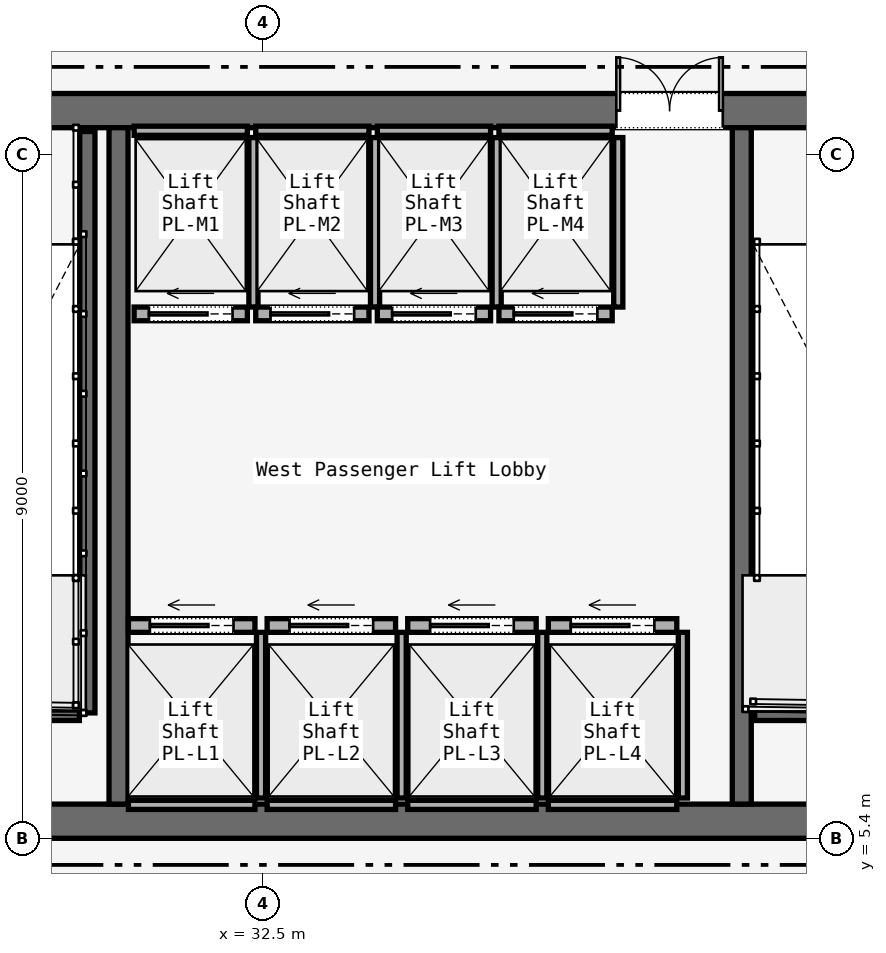
"""IFC4 building model, lengths in metres.
Left out: names, types, materials, properties, quantities, classifications, styles, units other than length and angle.
Written with IfcOpenShell. Run it as: python <this file> out.ifc"""

import sys

from ifc_helpers import new_model, si_unit, direction, frame, frame_2d, origin, place, context, subcontext, project, spatial, rectangle, extrude, element, fill, save


model = new_model("IFC4")
c1 = context("Model", 3, precision=1e-05, world=origin(), true_north=direction((0.0, 1.0)))
c2 = subcontext(c1, "Body", "Model", "MODEL_VIEW")
j1 = project(units=[si_unit("LENGTHUNIT", "METRE"), si_unit("PLANEANGLEUNIT", "RADIAN")], contexts=[c1])
p1 = place(None, origin())
s1 = spatial("IfcSite", under=j1, at=p1, CompositionType="ELEMENT")
p2 = place(p1, origin())
s2 = spatial("IfcBuilding", under=s1, at=p2, CompositionType="ELEMENT")
p3 = place(p2, origin())
s3 = spatial("IfcBuildingStorey", under=s2, at=p3, CompositionType="ELEMENT", Elevation=0.0)
p4 = place(p3, frame((26.45, 14.975, 0.0), z_axis=(0.0, 0.0, 1.0), x_axis=(1.0, 0.0, 0.0)))
e1 = element("IfcWall", 1, at=p4, inside=s3, PredefinedType="SOLIDWALL", context=c2, shape_type="SweptSolid", body=[
    extrude(rectangle(XDim=31.1, YDim=0.45, at=frame_2d((15.55, 0.0))), origin(), (0.0, 0.0, 1.0), 5.7),
])
p5 = place(p4, frame((1.65, 0.0, 0.0)))
e2 = element("IfcOpeningElement", 2, at=p5, cuts=e1, PredefinedType="OPENING", context=c2, shape_type="SweptSolid", body=[
    extrude(rectangle(XDim=1.1, YDim=2.2, at=frame_2d((0.55, 1.1))), frame((0.0, 0.225, 0.0), z_axis=(0.0, -1.0, 0.0), x_axis=(1.0, 0.0, 0.0)), (0.0, 0.0, 1.0), 0.45),
])
p6 = place(p4, frame((13.65, 0.0, 0.0)))
e3 = element("IfcOpeningElement", 3, at=p6, cuts=e1, PredefinedType="OPENING", context=c2, shape_type="SweptSolid", body=[
    extrude(rectangle(XDim=1.1, YDim=2.2, at=frame_2d((0.55, 1.1))), frame((0.0, 0.225, 0.0), z_axis=(0.0, -1.0, 0.0), x_axis=(1.0, 0.0, 0.0)), (0.0, 0.0, 1.0), 0.45),
])
p7 = place(p4, frame((25.55, 0.0, 0.0)))
e4 = element("IfcOpeningElement", 4, at=p7, cuts=e1, PredefinedType="OPENING", context=c2, shape_type="SweptSolid", body=[
    extrude(rectangle(XDim=1.1, YDim=2.2, at=frame_2d((0.55, 1.1))), frame((0.0, 0.225, 0.0), z_axis=(0.0, -1.0, 0.0), x_axis=(1.0, 0.0, 0.0)), (0.0, 0.0, 1.0), 0.45),
])
p8 = place(p4, frame((10.7, 0.0, 0.0)))
e5 = element("IfcOpeningElement", 5, at=p8, cuts=e1, PredefinedType="OPENING", context=c2, shape_type="SweptSolid", body=[
    extrude(rectangle(XDim=1.4, YDim=2.2, at=frame_2d((0.7, 1.1))), frame((0.0, 0.225, 0.0), z_axis=(0.0, -1.0, 0.0), x_axis=(1.0, 0.0, 0.0)), (0.0, 0.0, 1.0), 0.45),
])
p9 = place(p4, frame((19.35, 0.0, 0.0)))
e6 = element("IfcOpeningElement", 6, at=p9, cuts=e1, PredefinedType="OPENING", context=c2, shape_type="SweptSolid", body=[
    extrude(rectangle(XDim=1.1, YDim=2.2, at=frame_2d((0.55, 1.1))), frame((0.0, 0.225, 0.0), z_axis=(0.0, -1.0, 0.0), x_axis=(1.0, 0.0, 0.0)), (0.0, 0.0, 1.0), 0.45),
])
p10 = place(p4, frame((21.4, 0.0, 0.0)))
e7 = element("IfcOpeningElement", 7, at=p10, cuts=e1, PredefinedType="OPENING", context=c2, shape_type="SweptSolid", body=[
    extrude(rectangle(XDim=0.9, YDim=2.1, at=frame_2d((0.45, 1.05))), frame((0.0, 0.225, 0.0), z_axis=(0.0, -1.0, 0.0), x_axis=(1.0, 0.0, 0.0)), (0.0, 0.0, 1.0), 0.45),
])
p11 = place(p4, frame((23.35, 0.0, 0.0)))
e8 = element("IfcOpeningElement", 8, at=p11, cuts=e1, PredefinedType="OPENING", context=c2, shape_type="SweptSolid", body=[
    extrude(rectangle(XDim=1.3, YDim=2.3, at=frame_2d((0.65, 1.15))), frame((0.0, 0.225, 0.0), z_axis=(0.0, -1.0, 0.0), x_axis=(1.0, 0.0, 0.0)), (0.0, 0.0, 1.0), 0.45),
])
p12 = place(p3, frame((26.45, 5.625, 0.0), z_axis=(0.0, 0.0, 1.0), x_axis=(1.0, 0.0, 0.0)))
e9 = element("IfcWall", 9, at=p12, inside=s3, PredefinedType="SOLIDWALL", context=c2, shape_type="SweptSolid", body=[
    extrude(rectangle(XDim=31.1, YDim=0.45, at=frame_2d((15.55, 0.0))), origin(), (0.0, 0.0, 1.0), 5.7),
])
for number, where, z_axis, x_axis in (
    (10, (30.6, 5.85, 0.0), (0.0, 0.0, 1.0), (0.0, 1.0, 0.0)),
    (11, (38.8, 5.85, 0.0), (0.0, 0.0, 1.0), (0.0, 1.0, 0.0)),
):
    element("IfcWall", number, at=place(p3, frame(where, z_axis=z_axis, x_axis=x_axis)), inside=s3, PredefinedType="SOLIDWALL", context=c2, shape_type="SweptSolid", body=[
        extrude(rectangle(XDim=8.9, YDim=0.25, at=frame_2d((4.45, 0.0))), origin(), (0.0, 0.0, 1.0), 5.7),
    ])
p13 = place(p3, frame((30.19, 14.7, 0.0), z_axis=(0.0, 0.0, 1.0), x_axis=(0.0, -1.0, 0.0)))
e12 = element("IfcWall", 12, at=p13, inside=s3, PredefinedType="SOLIDWALL", context=c2, shape_type="SweptSolid", body=[
    extrude(rectangle(XDim=7.65, YDim=0.2, at=frame_2d((3.825, 0.0))), origin(), (0.0, 0.0, 1.0), 6.0),
])
for number, where, z_axis, x_axis in (
    (13, (26.97, 7.05, 0.0), (0.0, 0.0, 1.0), (1.0, 0.0, 0.0)),
    (14, (38.97, 7.05, 0.0), (0.0, 0.0, 1.0), (1.0, 0.0, 0.0)),
):
    element("IfcWall", number, at=place(p3, frame(where, z_axis=z_axis, x_axis=x_axis)), inside=s3, PredefinedType="SOLIDWALL", context=c2, shape_type="SweptSolid", body=[
        extrude(rectangle(XDim=3.115, YDim=0.2, at=frame_2d((1.558, 0.0))), origin(), (0.0, 0.0, 1.0), 6.0),
    ])
p14 = place(p3, frame((30.73, 8.2, 0.0), z_axis=(0.0, 0.0, 1.0), x_axis=(1.0, 0.0, 0.0)))
e15 = element("IfcWall", 15, at=p14, inside=s3, PredefinedType="SOLIDWALL", context=c2, shape_type="SweptSolid", body=[
    extrude(rectangle(XDim=1.665, YDim=0.18, at=frame_2d((0.833, 0.0))), origin(), (0.0, 0.0, 1.0), 3.6),
])
p15 = place(p14, frame((0.282, 0.0, 0.0)))
e16 = element("IfcOpeningElement", 16, at=p15, cuts=e15, PredefinedType="OPENING", context=c2, shape_type="SweptSolid", body=[
    extrude(rectangle(XDim=1.1, YDim=2.2, at=frame_2d((0.55, 1.1))), frame((0.0, 0.09, 0.0), z_axis=(0.0, -1.0, 0.0), x_axis=(1.0, 0.0, 0.0)), (0.0, 0.0, 1.0), 0.18),
])
p16 = place(p3, frame((30.73, 5.84, 0.0), z_axis=(0.0, 0.0, 1.0), x_axis=(1.0, 0.0, 0.0)))
e17 = element("IfcWall", 17, at=p16, inside=s3, PredefinedType="SOLIDWALL", context=c2, shape_type="SweptSolid", body=[
    extrude(rectangle(XDim=1.665, YDim=0.12, at=frame_2d((0.833, 0.0))), origin(), (0.0, 0.0, 1.0), 3.6),
])
p17 = place(p3, frame((32.475, 5.93, 0.0), z_axis=(0.0, 0.0, 1.0), x_axis=(0.0, 1.0, 0.0)))
e18 = element("IfcWall", 18, at=p17, inside=s3, PredefinedType="SOLIDWALL", context=c2, shape_type="SweptSolid", body=[
    extrude(rectangle(XDim=2.18, YDim=0.12, at=frame_2d((1.09, 0.0))), origin(), (0.0, 0.0, 1.0), 3.6),
])
p18 = place(p3, frame((32.555, 8.2, 0.0), z_axis=(0.0, 0.0, 1.0), x_axis=(1.0, 0.0, 0.0)))
e19 = element("IfcWall", 19, at=p18, inside=s3, PredefinedType="SOLIDWALL", context=c2, shape_type="SweptSolid", body=[
    extrude(rectangle(XDim=1.69, YDim=0.18, at=frame_2d((0.845, 0.0))), origin(), (0.0, 0.0, 1.0), 3.6),
])
p19 = place(p18, frame((0.295, 0.0, 0.0)))
e20 = element("IfcOpeningElement", 20, at=p19, cuts=e19, PredefinedType="OPENING", context=c2, shape_type="SweptSolid", body=[
    extrude(rectangle(XDim=1.1, YDim=2.2, at=frame_2d((0.55, 1.1))), frame((0.0, 0.09, 0.0), z_axis=(0.0, -1.0, 0.0), x_axis=(1.0, 0.0, 0.0)), (0.0, 0.0, 1.0), 0.18),
])
p20 = place(p3, frame((32.555, 5.84, 0.0), z_axis=(0.0, 0.0, 1.0), x_axis=(1.0, 0.0, 0.0)))
e21 = element("IfcWall", 21, at=p20, inside=s3, PredefinedType="SOLIDWALL", context=c2, shape_type="SweptSolid", body=[
    extrude(rectangle(XDim=1.69, YDim=0.12, at=frame_2d((0.845, 0.0))), origin(), (0.0, 0.0, 1.0), 3.6),
])
p21 = place(p3, frame((34.325, 5.93, 0.0), z_axis=(0.0, 0.0, 1.0), x_axis=(0.0, 1.0, 0.0)))
e22 = element("IfcWall", 22, at=p21, inside=s3, PredefinedType="SOLIDWALL", context=c2, shape_type="SweptSolid", body=[
    extrude(rectangle(XDim=2.18, YDim=0.12, at=frame_2d((1.09, 0.0))), origin(), (0.0, 0.0, 1.0), 3.6),
])
p22 = place(p3, frame((34.405, 8.2, 0.0), z_axis=(0.0, 0.0, 1.0), x_axis=(1.0, 0.0, 0.0)))
e23 = element("IfcWall", 23, at=p22, inside=s3, PredefinedType="SOLIDWALL", context=c2, shape_type="SweptSolid", body=[
    extrude(rectangle(XDim=1.69, YDim=0.18, at=frame_2d((0.845, 0.0))), origin(), (0.0, 0.0, 1.0), 3.6),
])
p23 = place(p22, frame((0.295, 0.0, 0.0)))
e24 = element("IfcOpeningElement", 24, at=p23, cuts=e23, PredefinedType="OPENING", context=c2, shape_type="SweptSolid", body=[
    extrude(rectangle(XDim=1.1, YDim=2.2, at=frame_2d((0.55, 1.1))), frame((0.0, 0.09, 0.0), z_axis=(0.0, -1.0, 0.0), x_axis=(1.0, 0.0, 0.0)), (0.0, 0.0, 1.0), 0.18),
])
p24 = place(p3, frame((34.405, 5.84, 0.0), z_axis=(0.0, 0.0, 1.0), x_axis=(1.0, 0.0, 0.0)))
e25 = element("IfcWall", 25, at=p24, inside=s3, PredefinedType="SOLIDWALL", context=c2, shape_type="SweptSolid", body=[
    extrude(rectangle(XDim=1.69, YDim=0.12, at=frame_2d((0.845, 0.0))), origin(), (0.0, 0.0, 1.0), 3.6),
])
p25 = place(p3, frame((36.175, 5.93, 0.0), z_axis=(0.0, 0.0, 1.0), x_axis=(0.0, 1.0, 0.0)))
e26 = element("IfcWall", 26, at=p25, inside=s3, PredefinedType="SOLIDWALL", context=c2, shape_type="SweptSolid", body=[
    extrude(rectangle(XDim=2.18, YDim=0.12, at=frame_2d((1.09, 0.0))), origin(), (0.0, 0.0, 1.0), 3.6),
])
p26 = place(p3, frame((36.255, 8.2, 0.0), z_axis=(0.0, 0.0, 1.0), x_axis=(1.0, 0.0, 0.0)))
e27 = element("IfcWall", 27, at=p26, inside=s3, PredefinedType="SOLIDWALL", context=c2, shape_type="SweptSolid", body=[
    extrude(rectangle(XDim=1.69, YDim=0.18, at=frame_2d((0.845, 0.0))), origin(), (0.0, 0.0, 1.0), 3.6),
])
p27 = place(p26, frame((0.295, 0.0, 0.0)))
e28 = element("IfcOpeningElement", 28, at=p27, cuts=e27, PredefinedType="OPENING", context=c2, shape_type="SweptSolid", body=[
    extrude(rectangle(XDim=1.1, YDim=2.2, at=frame_2d((0.55, 1.1))), frame((0.0, 0.09, 0.0), z_axis=(0.0, -1.0, 0.0), x_axis=(1.0, 0.0, 0.0)), (0.0, 0.0, 1.0), 0.18),
])
p28 = place(p3, frame((36.255, 5.84, 0.0), z_axis=(0.0, 0.0, 1.0), x_axis=(1.0, 0.0, 0.0)))
e29 = element("IfcWall", 29, at=p28, inside=s3, PredefinedType="SOLIDWALL", context=c2, shape_type="SweptSolid", body=[
    extrude(rectangle(XDim=1.69, YDim=0.12, at=frame_2d((0.845, 0.0))), origin(), (0.0, 0.0, 1.0), 3.6),
])
p29 = place(p3, frame((38.025, 5.93, 0.0), z_axis=(0.0, 0.0, 1.0), x_axis=(0.0, 1.0, 0.0)))
e30 = element("IfcWall", 30, at=p29, inside=s3, PredefinedType="SOLIDWALL", context=c2, shape_type="SweptSolid", body=[
    extrude(rectangle(XDim=2.18, YDim=0.12, at=frame_2d((1.09, 0.0))), origin(), (0.0, 0.0, 1.0), 3.6),
])
p30 = place(p3, frame((30.805, 12.3, 0.0), z_axis=(0.0, 0.0, 1.0), x_axis=(1.0, 0.0, 0.0)))
e31 = element("IfcWall", 31, at=p30, inside=s3, PredefinedType="SOLIDWALL", context=c2, shape_type="SweptSolid", body=[
    extrude(rectangle(XDim=1.49, YDim=0.18, at=frame_2d((0.745, 0.0))), origin(), (0.0, 0.0, 1.0), 3.6),
])
p31 = place(p30, frame((0.195, 0.0, 0.0)))
e32 = element("IfcOpeningElement", 32, at=p31, cuts=e31, PredefinedType="OPENING", context=c2, shape_type="SweptSolid", body=[
    extrude(rectangle(XDim=1.1, YDim=2.2, at=frame_2d((0.55, 1.1))), frame((0.0, 0.09, 0.0), z_axis=(0.0, -1.0, 0.0), x_axis=(1.0, 0.0, 0.0)), (0.0, 0.0, 1.0), 0.18),
])
p32 = place(p3, frame((30.805, 14.71, 0.0), z_axis=(0.0, 0.0, 1.0), x_axis=(1.0, 0.0, 0.0)))
e33 = element("IfcWall", 33, at=p32, inside=s3, PredefinedType="SOLIDWALL", context=c2, shape_type="SweptSolid", body=[
    extrude(rectangle(XDim=1.49, YDim=0.12, at=frame_2d((0.745, 0.0))), origin(), (0.0, 0.0, 1.0), 3.6),
])
p33 = place(p3, frame((32.375, 12.39, 0.0), z_axis=(0.0, 0.0, 1.0), x_axis=(0.0, 1.0, 0.0)))
e34 = element("IfcWall", 34, at=p33, inside=s3, PredefinedType="SOLIDWALL", context=c2, shape_type="SweptSolid", body=[
    extrude(rectangle(XDim=2.23, YDim=0.12, at=frame_2d((1.115, 0.0))), origin(), (0.0, 0.0, 1.0), 3.6),
])
p34 = place(p3, frame((32.405, 12.3, 0.0), z_axis=(0.0, 0.0, 1.0), x_axis=(1.0, 0.0, 0.0)))
e35 = element("IfcWall", 35, at=p34, inside=s3, PredefinedType="SOLIDWALL", context=c2, shape_type="SweptSolid", body=[
    extrude(rectangle(XDim=1.49, YDim=0.18, at=frame_2d((0.745, 0.0))), origin(), (0.0, 0.0, 1.0), 3.6),
])
p35 = place(p34, frame((0.195, 0.0, 0.0)))
e36 = element("IfcOpeningElement", 36, at=p35, cuts=e35, PredefinedType="OPENING", context=c2, shape_type="SweptSolid", body=[
    extrude(rectangle(XDim=1.1, YDim=2.2, at=frame_2d((0.55, 1.1))), frame((0.0, 0.09, 0.0), z_axis=(0.0, -1.0, 0.0), x_axis=(1.0, 0.0, 0.0)), (0.0, 0.0, 1.0), 0.18),
])
p36 = place(p3, frame((32.405, 14.71, 0.0), z_axis=(0.0, 0.0, 1.0), x_axis=(1.0, 0.0, 0.0)))
e37 = element("IfcWall", 37, at=p36, inside=s3, PredefinedType="SOLIDWALL", context=c2, shape_type="SweptSolid", body=[
    extrude(rectangle(XDim=1.49, YDim=0.12, at=frame_2d((0.745, 0.0))), origin(), (0.0, 0.0, 1.0), 3.6),
])
p37 = place(p3, frame((33.975, 12.39, 0.0), z_axis=(0.0, 0.0, 1.0), x_axis=(0.0, 1.0, 0.0)))
e38 = element("IfcWall", 38, at=p37, inside=s3, PredefinedType="SOLIDWALL", context=c2, shape_type="SweptSolid", body=[
    extrude(rectangle(XDim=2.23, YDim=0.12, at=frame_2d((1.115, 0.0))), origin(), (0.0, 0.0, 1.0), 3.6),
])
p38 = place(p3, frame((34.005, 12.3, 0.0), z_axis=(0.0, 0.0, 1.0), x_axis=(1.0, 0.0, 0.0)))
e39 = element("IfcWall", 39, at=p38, inside=s3, PredefinedType="SOLIDWALL", context=c2, shape_type="SweptSolid", body=[
    extrude(rectangle(XDim=1.49, YDim=0.18, at=frame_2d((0.745, 0.0))), origin(), (0.0, 0.0, 1.0), 3.6),
])
p39 = place(p38, frame((0.195, 0.0, 0.0)))
e40 = element("IfcOpeningElement", 40, at=p39, cuts=e39, PredefinedType="OPENING", context=c2, shape_type="SweptSolid", body=[
    extrude(rectangle(XDim=1.1, YDim=2.2, at=frame_2d((0.55, 1.1))), frame((0.0, 0.09, 0.0), z_axis=(0.0, -1.0, 0.0), x_axis=(1.0, 0.0, 0.0)), (0.0, 0.0, 1.0), 0.18),
])
p40 = place(p3, frame((34.005, 14.71, 0.0), z_axis=(0.0, 0.0, 1.0), x_axis=(1.0, 0.0, 0.0)))
e41 = element("IfcWall", 41, at=p40, inside=s3, PredefinedType="SOLIDWALL", context=c2, shape_type="SweptSolid", body=[
    extrude(rectangle(XDim=1.49, YDim=0.12, at=frame_2d((0.745, 0.0))), origin(), (0.0, 0.0, 1.0), 3.6),
])
p41 = place(p3, frame((35.575, 12.39, 0.0), z_axis=(0.0, 0.0, 1.0), x_axis=(0.0, 1.0, 0.0)))
e42 = element("IfcWall", 42, at=p41, inside=s3, PredefinedType="SOLIDWALL", context=c2, shape_type="SweptSolid", body=[
    extrude(rectangle(XDim=2.23, YDim=0.12, at=frame_2d((1.115, 0.0))), origin(), (0.0, 0.0, 1.0), 3.6),
])
p42 = place(p3, frame((35.605, 12.3, 0.0), z_axis=(0.0, 0.0, 1.0), x_axis=(1.0, 0.0, 0.0)))
e43 = element("IfcWall", 43, at=p42, inside=s3, PredefinedType="SOLIDWALL", context=c2, shape_type="SweptSolid", body=[
    extrude(rectangle(XDim=1.49, YDim=0.18, at=frame_2d((0.745, 0.0))), origin(), (0.0, 0.0, 1.0), 3.6),
])
p43 = place(p42, frame((0.195, 0.0, 0.0)))
e44 = element("IfcOpeningElement", 44, at=p43, cuts=e43, PredefinedType="OPENING", context=c2, shape_type="SweptSolid", body=[
    extrude(rectangle(XDim=1.1, YDim=2.2, at=frame_2d((0.55, 1.1))), frame((0.0, 0.09, 0.0), z_axis=(0.0, -1.0, 0.0), x_axis=(1.0, 0.0, 0.0)), (0.0, 0.0, 1.0), 0.18),
])
p44 = place(p3, frame((35.605, 14.71, 0.0), z_axis=(0.0, 0.0, 1.0), x_axis=(1.0, 0.0, 0.0)))
e45 = element("IfcWall", 45, at=p44, inside=s3, PredefinedType="SOLIDWALL", context=c2, shape_type="SweptSolid", body=[
    extrude(rectangle(XDim=1.49, YDim=0.12, at=frame_2d((0.745, 0.0))), origin(), (0.0, 0.0, 1.0), 3.6),
])
p45 = place(p3, frame((37.175, 12.39, 0.0), z_axis=(0.0, 0.0, 1.0), x_axis=(0.0, 1.0, 0.0)))
e46 = element("IfcWall", 46, at=p45, inside=s3, PredefinedType="SOLIDWALL", context=c2, shape_type="SweptSolid", body=[
    extrude(rectangle(XDim=2.23, YDim=0.12, at=frame_2d((1.115, 0.0))), origin(), (0.0, 0.0, 1.0), 3.6),
])
p46 = place(p8, origin())
e47 = element("IfcDoor", 47, at=p46, inside=s3, OperationType="DOUBLE_DOOR_SINGLE_SWING", PredefinedType="DOOR", context=c2, shape_type="SweptSolid", body=[
    extrude(rectangle(XDim=1.4, YDim=2.2, at=frame_2d((0.7, 1.1))), frame((0.0, 0.025, 0.0), z_axis=(0.0, -1.0, 0.0), x_axis=(1.0, 0.0, 0.0)), (0.0, 0.0, 1.0), 0.05),
])
fill(e5, e47)
p47 = place(p15, origin())
e48 = element("IfcDoor", 48, at=p47, inside=s3, OperationType="SLIDING_TO_LEFT", PredefinedType="DOOR", context=c2, shape_type="SweptSolid", body=[
    extrude(rectangle(XDim=1.1, YDim=2.2, at=frame_2d((0.55, 1.1))), frame((0.0, 0.025, 0.0), z_axis=(0.0, -1.0, 0.0), x_axis=(1.0, 0.0, 0.0)), (0.0, 0.0, 1.0), 0.05),
])
fill(e16, e48)
p48 = place(p19, origin())
e49 = element("IfcDoor", 49, at=p48, inside=s3, OperationType="SLIDING_TO_LEFT", PredefinedType="DOOR", context=c2, shape_type="SweptSolid", body=[
    extrude(rectangle(XDim=1.1, YDim=2.2, at=frame_2d((0.55, 1.1))), frame((0.0, 0.025, 0.0), z_axis=(0.0, -1.0, 0.0), x_axis=(1.0, 0.0, 0.0)), (0.0, 0.0, 1.0), 0.05),
])
fill(e20, e49)
p49 = place(p23, origin())
e50 = element("IfcDoor", 50, at=p49, inside=s3, OperationType="SLIDING_TO_LEFT", PredefinedType="DOOR", context=c2, shape_type="SweptSolid", body=[
    extrude(rectangle(XDim=1.1, YDim=2.2, at=frame_2d((0.55, 1.1))), frame((0.0, 0.025, 0.0), z_axis=(0.0, -1.0, 0.0), x_axis=(1.0, 0.0, 0.0)), (0.0, 0.0, 1.0), 0.05),
])
fill(e24, e50)
p50 = place(p27, origin())
e51 = element("IfcDoor", 51, at=p50, inside=s3, OperationType="SLIDING_TO_LEFT", PredefinedType="DOOR", context=c2, shape_type="SweptSolid", body=[
    extrude(rectangle(XDim=1.1, YDim=2.2, at=frame_2d((0.55, 1.1))), frame((0.0, 0.025, 0.0), z_axis=(0.0, -1.0, 0.0), x_axis=(1.0, 0.0, 0.0)), (0.0, 0.0, 1.0), 0.05),
])
fill(e28, e51)
p51 = place(p31, origin())
e52 = element("IfcDoor", 52, at=p51, inside=s3, OperationType="SLIDING_TO_LEFT", PredefinedType="DOOR", context=c2, shape_type="SweptSolid", body=[
    extrude(rectangle(XDim=1.1, YDim=2.2, at=frame_2d((0.55, 1.1))), frame((0.0, 0.025, 0.0), z_axis=(0.0, -1.0, 0.0), x_axis=(1.0, 0.0, 0.0)), (0.0, 0.0, 1.0), 0.05),
])
fill(e32, e52)
p52 = place(p35, origin())
e53 = element("IfcDoor", 53, at=p52, inside=s3, OperationType="SLIDING_TO_LEFT", PredefinedType="DOOR", context=c2, shape_type="SweptSolid", body=[
    extrude(rectangle(XDim=1.1, YDim=2.2, at=frame_2d((0.55, 1.1))), frame((0.0, 0.025, 0.0), z_axis=(0.0, -1.0, 0.0), x_axis=(1.0, 0.0, 0.0)), (0.0, 0.0, 1.0), 0.05),
])
fill(e36, e53)
p53 = place(p39, origin())
e54 = element("IfcDoor", 54, at=p53, inside=s3, OperationType="SLIDING_TO_LEFT", PredefinedType="DOOR", context=c2, shape_type="SweptSolid", body=[
    extrude(rectangle(XDim=1.1, YDim=2.2, at=frame_2d((0.55, 1.1))), frame((0.0, 0.025, 0.0), z_axis=(0.0, -1.0, 0.0), x_axis=(1.0, 0.0, 0.0)), (0.0, 0.0, 1.0), 0.05),
])
fill(e40, e54)
p54 = place(p43, origin())
e55 = element("IfcDoor", 55, at=p54, inside=s3, OperationType="SLIDING_TO_LEFT", PredefinedType="DOOR", context=c2, shape_type="SweptSolid", body=[
    extrude(rectangle(XDim=1.1, YDim=2.2, at=frame_2d((0.55, 1.1))), frame((0.0, 0.025, 0.0), z_axis=(0.0, -1.0, 0.0), x_axis=(1.0, 0.0, 0.0)), (0.0, 0.0, 1.0), 0.05),
])
fill(e44, e55)
save(model, sys.argv[1])
